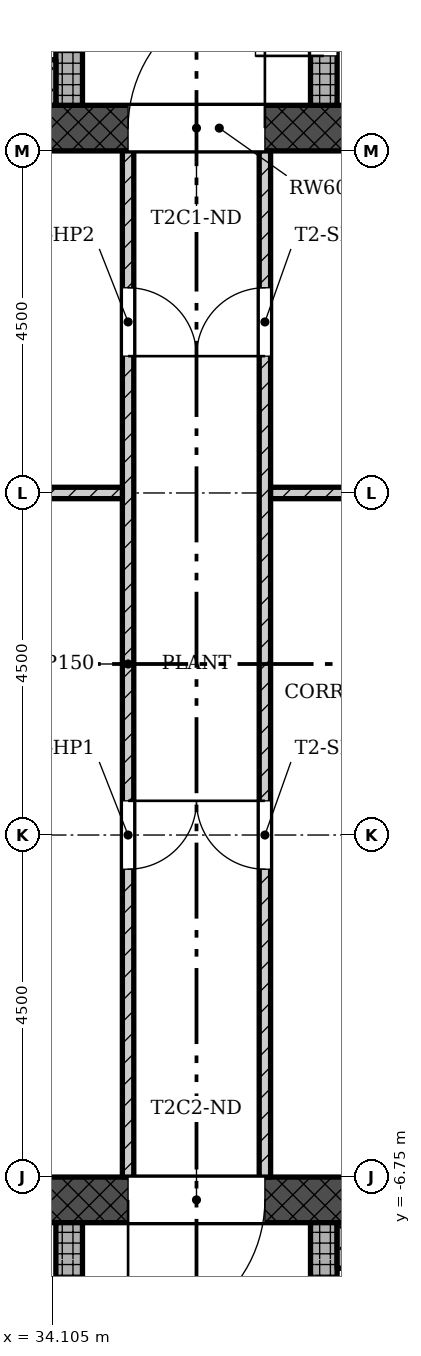
"""IFC4 building model, lengths in metres.
Left out: names, types, materials, properties, quantities, classifications, styles, units other than length and angle.
Written with IfcOpenShell. Run it as: python <this file> out.ifc"""

import sys

from ifc_helpers import new_model, si_unit, direction, frame, frame_2d, origin, place, context, subcontext, project, spatial, rectangle, extrude, element, fill, save


model = new_model("IFC4")
c1 = context("Model", 3, precision=1e-05, world=origin(), true_north=direction((0.0, 1.0)))
c2 = subcontext(c1, "Body", "Model", "MODEL_VIEW")
j1 = project(units=[si_unit("LENGTHUNIT", "METRE"), si_unit("PLANEANGLEUNIT", "RADIAN")], contexts=[c1])
p1 = place(None, origin())
s1 = spatial("IfcSite", under=j1, at=p1, CompositionType="ELEMENT")
p2 = place(p1, origin())
s2 = spatial("IfcBuilding", under=s1, at=p2, CompositionType="ELEMENT")
p3 = place(p2, frame((0.0, 0.0, 260.4)))
s3 = spatial("IfcBuildingStorey", under=s2, at=p3, CompositionType="ELEMENT", Elevation=260.4)
p4 = place(p3, frame((29.85, 7.05, 0.0), z_axis=(0.0, 0.0, 1.0), x_axis=(1.0, 0.0, 0.0)))
e1 = element("IfcWall", 1, at=p4, inside=s3, PredefinedType="SHEAR", context=c2, shape_type="SweptSolid", body=[
    extrude(rectangle(XDim=12.9, YDim=0.6, at=frame_2d((6.45, 0.0))), origin(), (0.0, 0.0, 1.0), 4.5),
])
p5 = place(p4, frame((5.25, 0.0, 0.0)))
e2 = element("IfcOpeningElement", 2, at=p5, cuts=e1, PredefinedType="OPENING", context=c2, shape_type="SweptSolid", body=[
    extrude(rectangle(XDim=1.8, YDim=2.1, at=frame_2d((0.9, 1.05))), frame((0.0, 0.31, 0.0), z_axis=(0.0, -1.0, 0.0), x_axis=(1.0, 0.0, 0.0)), (0.0, 0.0, 1.0), 0.62),
])
p6 = place(p3, frame((34.325, 7.35, 0.0), z_axis=(0.0, 0.0, 1.0), x_axis=(0.0, 1.0, 0.0)))
e3 = element("IfcWall", 3, at=p6, inside=s3, PredefinedType="SHEAR", context=c2, shape_type="SweptSolid", body=[
    extrude(rectangle(XDim=7.8, YDim=0.35, at=frame_2d((3.9, 0.0))), origin(), (0.0, 0.0, 1.0), 4.5),
])
p7 = place(p6, frame((1.05, 0.0, 0.0)))
e4 = element("IfcOpeningElement", 4, at=p7, cuts=e3, PredefinedType="OPENING", context=c2, shape_type="SweptSolid", body=[
    extrude(rectangle(XDim=0.9, YDim=2.1, at=frame_2d((0.45, 1.05))), frame((0.0, 0.185, 0.0), z_axis=(0.0, -1.0, 0.0), x_axis=(1.0, 0.0, 0.0)), (0.0, 0.0, 1.0), 0.37),
])
p8 = place(p3, frame((37.675, 7.35, 0.0), z_axis=(0.0, 0.0, 1.0), x_axis=(0.0, 1.0, 0.0)))
e5 = element("IfcWall", 5, at=p8, inside=s3, PredefinedType="SHEAR", context=c2, shape_type="SweptSolid", body=[
    extrude(rectangle(XDim=7.8, YDim=0.35, at=frame_2d((3.9, 0.0))), origin(), (0.0, 0.0, 1.0), 4.5),
])
p9 = place(p8, frame((0.65, 0.0, 0.0)))
e6 = element("IfcOpeningElement", 6, at=p9, cuts=e5, PredefinedType="OPENING", context=c2, shape_type="SweptSolid", body=[
    extrude(rectangle(XDim=0.9, YDim=2.1, at=frame_2d((0.45, 1.05))), frame((0.0, 0.185, 0.0), z_axis=(0.0, -1.0, 0.0), x_axis=(1.0, 0.0, 0.0)), (0.0, 0.0, 1.0), 0.37),
])
p10 = place(p8, frame((3.35, 0.0, 0.0)))
e7 = element("IfcOpeningElement", 7, at=p10, cuts=e5, PredefinedType="OPENING", context=c2, shape_type="SweptSolid", body=[
    extrude(rectangle(XDim=0.9, YDim=2.1, at=frame_2d((0.45, 1.05))), frame((0.0, 0.185, 0.0), z_axis=(0.0, -1.0, 0.0), x_axis=(1.0, 0.0, 0.0)), (0.0, 0.0, 1.0), 0.37),
])
p11 = place(p8, frame((5.65, 0.0, 0.0)))
e8 = element("IfcOpeningElement", 8, at=p11, cuts=e5, PredefinedType="OPENING", context=c2, shape_type="SweptSolid", body=[
    extrude(rectangle(XDim=0.9, YDim=2.1, at=frame_2d((0.45, 1.05))), frame((0.0, 0.185, 0.0), z_axis=(0.0, -1.0, 0.0), x_axis=(1.0, 0.0, 0.0)), (0.0, 0.0, 1.0), 0.37),
])
p12 = place(p3, frame((42.15, -7.05, 0.0), z_axis=(0.0, 0.0, 1.0), x_axis=(-1.0, 0.0, 0.0)))
e9 = element("IfcWall", 9, at=p12, inside=s3, PredefinedType="SHEAR", context=c2, shape_type="SweptSolid", body=[
    extrude(rectangle(XDim=12.9, YDim=0.6, at=frame_2d((6.45, 0.0))), origin(), (0.0, 0.0, 1.0), 4.5),
])
p13 = place(p12, frame((5.25, 0.0, 0.0)))
e10 = element("IfcOpeningElement", 10, at=p13, cuts=e9, PredefinedType="OPENING", context=c2, shape_type="SweptSolid", body=[
    extrude(rectangle(XDim=1.8, YDim=2.1, at=frame_2d((0.9, 1.05))), frame((0.0, 0.31, 0.0), z_axis=(0.0, -1.0, 0.0), x_axis=(1.0, 0.0, 0.0)), (0.0, 0.0, 1.0), 0.62),
])
p14 = place(p3, frame((34.325, -15.15, 0.0), z_axis=(0.0, 0.0, 1.0), x_axis=(0.0, 1.0, 0.0)))
e11 = element("IfcWall", 11, at=p14, inside=s3, PredefinedType="SHEAR", context=c2, shape_type="SweptSolid", body=[
    extrude(rectangle(XDim=7.8, YDim=0.35, at=frame_2d((3.9, 0.0))), origin(), (0.0, 0.0, 1.0), 4.5),
])
p15 = place(p14, frame((5.55, 0.0, 0.0)))
e12 = element("IfcOpeningElement", 12, at=p15, cuts=e11, PredefinedType="OPENING", context=c2, shape_type="SweptSolid", body=[
    extrude(rectangle(XDim=1.1, YDim=2.1, at=frame_2d((0.55, 1.05))), frame((0.0, 0.185, 0.0), z_axis=(0.0, -1.0, 0.0), x_axis=(1.0, 0.0, 0.0)), (0.0, 0.0, 1.0), 0.37),
])
p16 = place(p14, frame((3.95, 0.0, 0.0)))
e13 = element("IfcOpeningElement", 13, at=p16, cuts=e11, PredefinedType="OPENING", context=c2, shape_type="SweptSolid", body=[
    extrude(rectangle(XDim=0.9, YDim=2.1, at=frame_2d((0.45, 1.05))), frame((0.0, 0.185, 0.0), z_axis=(0.0, -1.0, 0.0), x_axis=(1.0, 0.0, 0.0)), (0.0, 0.0, 1.0), 0.37),
])
p17 = place(p14, frame((2.75, 0.0, 0.0)))
e14 = element("IfcOpeningElement", 14, at=p17, cuts=e11, PredefinedType="OPENING", context=c2, shape_type="SweptSolid", body=[
    extrude(rectangle(XDim=0.9, YDim=2.1, at=frame_2d((0.45, 1.05))), frame((0.0, 0.185, 0.0), z_axis=(0.0, -1.0, 0.0), x_axis=(1.0, 0.0, 0.0)), (0.0, 0.0, 1.0), 0.37),
])
p18 = place(p14, frame((0.85, 0.0, 0.0)))
e15 = element("IfcOpeningElement", 15, at=p18, cuts=e11, PredefinedType="OPENING", context=c2, shape_type="SweptSolid", body=[
    extrude(rectangle(XDim=0.9, YDim=2.1, at=frame_2d((0.45, 1.05))), frame((0.0, 0.185, 0.0), z_axis=(0.0, -1.0, 0.0), x_axis=(1.0, 0.0, 0.0)), (0.0, 0.0, 1.0), 0.37),
])
p19 = place(p3, frame((37.675, -15.15, 0.0), z_axis=(0.0, 0.0, 1.0), x_axis=(0.0, 1.0, 0.0)))
e16 = element("IfcWall", 16, at=p19, inside=s3, PredefinedType="SHEAR", context=c2, shape_type="SweptSolid", body=[
    extrude(rectangle(XDim=7.8, YDim=0.35, at=frame_2d((3.9, 0.0))), origin(), (0.0, 0.0, 1.0), 4.5),
])
p20 = place(p19, frame((5.85, 0.0, 0.0)))
e17 = element("IfcOpeningElement", 17, at=p20, cuts=e16, PredefinedType="OPENING", context=c2, shape_type="SweptSolid", body=[
    extrude(rectangle(XDim=0.9, YDim=2.1, at=frame_2d((0.45, 1.05))), frame((0.0, 0.185, 0.0), z_axis=(0.0, -1.0, 0.0), x_axis=(1.0, 0.0, 0.0)), (0.0, 0.0, 1.0), 0.37),
])
p21 = place(p3, frame((35.1, -6.75, 0.0), z_axis=(0.0, 0.0, 1.0), x_axis=(0.0, 1.0, 0.0)))
e18 = element("IfcWall", 18, at=p21, inside=s3, PredefinedType="PARTITIONING", context=c2, shape_type="SweptSolid", body=[
    extrude(rectangle(XDim=13.5, YDim=0.15, at=frame_2d((6.75, 0.0))), origin(), (0.0, 0.0, 1.0), 4.09),
])
p22 = place(p21, frame((4.05, 0.0, 0.0)))
e19 = element("IfcOpeningElement", 19, at=p22, cuts=e18, PredefinedType="OPENING", context=c2, shape_type="SweptSolid", body=[
    extrude(rectangle(XDim=0.9, YDim=2.1, at=frame_2d((0.45, 1.05))), frame((0.0, 0.085, 0.0), z_axis=(0.0, -1.0, 0.0), x_axis=(1.0, 0.0, 0.0)), (0.0, 0.0, 1.0), 0.17),
])
p23 = place(p21, frame((10.8, 0.0, 0.0)))
e20 = element("IfcOpeningElement", 20, at=p23, cuts=e18, PredefinedType="OPENING", context=c2, shape_type="SweptSolid", body=[
    extrude(rectangle(XDim=0.9, YDim=2.1, at=frame_2d((0.45, 1.05))), frame((0.0, 0.085, 0.0), z_axis=(0.0, -1.0, 0.0), x_axis=(1.0, 0.0, 0.0)), (0.0, 0.0, 1.0), 0.17),
])
p24 = place(p3, frame((35.025, 2.25, 0.0), z_axis=(0.0, 0.0, 1.0), x_axis=(-1.0, 0.0, 0.0)))
e21 = element("IfcWall", 21, at=p24, inside=s3, PredefinedType="PARTITIONING", context=c2, shape_type="SweptSolid", body=[
    extrude(rectangle(XDim=5.875, YDim=0.15, at=frame_2d((2.938, 0.0))), origin(), (0.0, 0.0, 1.0), 4.09),
])
p25 = place(p3, frame((36.9, -6.75, 0.0), z_axis=(0.0, 0.0, 1.0), x_axis=(0.0, 1.0, 0.0)))
e22 = element("IfcWall", 22, at=p25, inside=s3, PredefinedType="PARTITIONING", context=c2, shape_type="SweptSolid", body=[
    extrude(rectangle(XDim=13.5, YDim=0.15, at=frame_2d((6.75, 0.0))), origin(), (0.0, 0.0, 1.0), 4.09),
])
p26 = place(p25, frame((4.05, 0.0, 0.0)))
e23 = element("IfcOpeningElement", 23, at=p26, cuts=e22, PredefinedType="OPENING", context=c2, shape_type="SweptSolid", body=[
    extrude(rectangle(XDim=0.9, YDim=2.1, at=frame_2d((0.45, 1.05))), frame((0.0, 0.085, 0.0), z_axis=(0.0, -1.0, 0.0), x_axis=(1.0, 0.0, 0.0)), (0.0, 0.0, 1.0), 0.17),
])
p27 = place(p25, frame((10.8, 0.0, 0.0)))
e24 = element("IfcOpeningElement", 24, at=p27, cuts=e22, PredefinedType="OPENING", context=c2, shape_type="SweptSolid", body=[
    extrude(rectangle(XDim=0.9, YDim=2.1, at=frame_2d((0.45, 1.05))), frame((0.0, 0.085, 0.0), z_axis=(0.0, -1.0, 0.0), x_axis=(1.0, 0.0, 0.0)), (0.0, 0.0, 1.0), 0.17),
])
p28 = place(p3, frame((36.975, 2.25, 0.0), z_axis=(0.0, 0.0, 1.0), x_axis=(1.0, 0.0, 0.0)))
e25 = element("IfcWall", 25, at=p28, inside=s3, PredefinedType="PARTITIONING", context=c2, shape_type="SweptSolid", body=[
    extrude(rectangle(XDim=5.875, YDim=0.15, at=frame_2d((2.938, 0.0))), origin(), (0.0, 0.0, 1.0), 4.09),
])
for number, where, z_axis, x_axis in (
    (26, (34.15, 7.65, 0.0), (0.0, 0.0, 1.0), (-1.0, 0.0, 0.0)),
    (27, (37.85, -7.65, 0.0), (0.0, 0.0, 1.0), (1.0, 0.0, 0.0)),
):
    element("IfcWall", number, at=place(p3, frame(where, z_axis=z_axis, x_axis=x_axis)), inside=s3, PredefinedType="SHEAR", context=c2, shape_type="SweptSolid", body=[
        extrude(rectangle(XDim=4.3, YDim=0.6, at=frame_2d((2.15, 0.0))), origin(), (0.0, 0.0, 1.0), 4.5),
    ])
p29 = place(p22, origin())
e28 = element("IfcDoor", 28, at=p29, inside=s3, OperationType="SINGLE_SWING_RIGHT", PredefinedType="DOOR", context=c2, shape_type="SweptSolid", body=[
    extrude(rectangle(XDim=0.9, YDim=2.1, at=frame_2d((0.45, 1.05))), frame((0.0, 0.025, 0.0), z_axis=(0.0, -1.0, 0.0), x_axis=(1.0, 0.0, 0.0)), (0.0, 0.0, 1.0), 0.05),
])
fill(e19, e28)
p30 = place(p23, origin())
e29 = element("IfcDoor", 29, at=p30, inside=s3, OperationType="SINGLE_SWING_LEFT", PredefinedType="DOOR", context=c2, shape_type="SweptSolid", body=[
    extrude(rectangle(XDim=0.9, YDim=2.1, at=frame_2d((0.45, 1.05))), frame((0.0, 0.025, 0.0), z_axis=(0.0, -1.0, 0.0), x_axis=(1.0, 0.0, 0.0)), (0.0, 0.0, 1.0), 0.05),
])
fill(e20, e29)
p31 = place(p26, origin())
e30 = element("IfcDoor", 30, at=p31, inside=s3, OperationType="SINGLE_SWING_LEFT", PredefinedType="DOOR", context=c2, shape_type="SweptSolid", body=[
    extrude(rectangle(XDim=0.9, YDim=2.1, at=frame_2d((0.45, 1.05))), frame((0.0, 0.025, 0.0), z_axis=(0.0, -1.0, 0.0), x_axis=(1.0, 0.0, 0.0)), (0.0, 0.0, 1.0), 0.05),
])
fill(e23, e30)
p32 = place(p27, origin())
e31 = element("IfcDoor", 31, at=p32, inside=s3, OperationType="SINGLE_SWING_RIGHT", PredefinedType="DOOR", context=c2, shape_type="SweptSolid", body=[
    extrude(rectangle(XDim=0.9, YDim=2.1, at=frame_2d((0.45, 1.05))), frame((0.0, 0.025, 0.0), z_axis=(0.0, -1.0, 0.0), x_axis=(1.0, 0.0, 0.0)), (0.0, 0.0, 1.0), 0.05),
])
fill(e24, e31)
p33 = place(p9, origin())
e32 = element("IfcDoor", 32, at=p33, inside=s3, OperationType="SINGLE_SWING_RIGHT", PredefinedType="DOOR", context=c2, shape_type="SweptSolid", body=[
    extrude(rectangle(XDim=0.9, YDim=2.1, at=frame_2d((0.45, 1.05))), frame((0.0, 0.025, 0.0), z_axis=(0.0, -1.0, 0.0), x_axis=(1.0, 0.0, 0.0)), (0.0, 0.0, 1.0), 0.05),
])
fill(e6, e32)
p34 = place(p5, origin())
e33 = element("IfcDoor", 33, at=p34, inside=s3, OperationType="SINGLE_SWING_LEFT", PredefinedType="DOOR", context=c2, shape_type="SweptSolid", body=[
    extrude(rectangle(XDim=1.8, YDim=2.1, at=frame_2d((0.9, 1.05))), frame((0.0, 0.025, 0.0), z_axis=(0.0, -1.0, 0.0), x_axis=(1.0, 0.0, 0.0)), (0.0, 0.0, 1.0), 0.05),
])
fill(e2, e33)
p35 = place(p13, origin())
e34 = element("IfcDoor", 34, at=p35, inside=s3, OperationType="SINGLE_SWING_LEFT", PredefinedType="DOOR", context=c2, shape_type="SweptSolid", body=[
    extrude(rectangle(XDim=1.8, YDim=2.1, at=frame_2d((0.9, 1.05))), frame((0.0, 0.025, 0.0), z_axis=(0.0, -1.0, 0.0), x_axis=(1.0, 0.0, 0.0)), (0.0, 0.0, 1.0), 0.05),
])
fill(e10, e34)
save(model, sys.argv[1])
